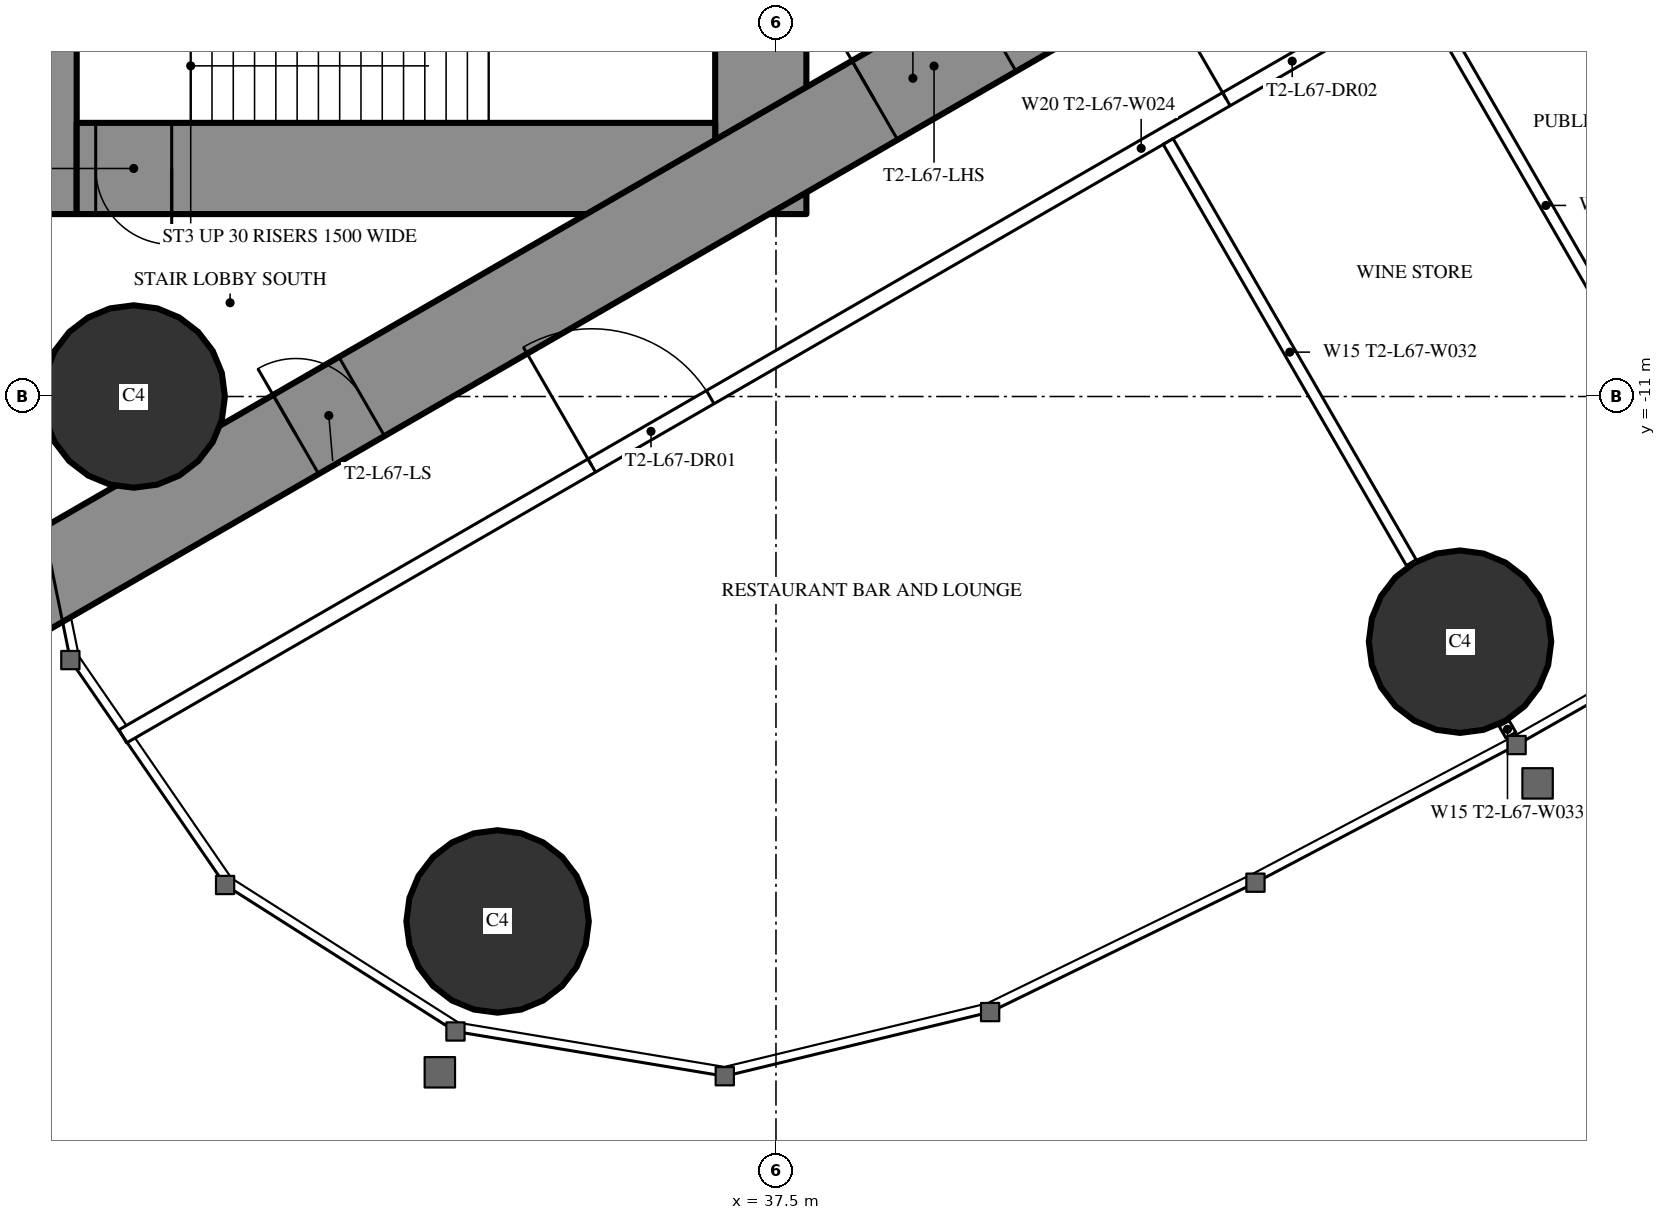
"""IFC4 building model, lengths in metres.
Left out: names, types, materials, properties, quantities, classifications, styles, units other than length and angle.
Written with IfcOpenShell. Run it as: python <this file> out.ifc"""

import sys

from ifc_helpers import new_model, si_unit, direction, frame, frame_2d, origin, origin_2d, place, context, subcontext, project, spatial, rectangle, circle, extrude, element, fill, save


model = new_model("IFC4")
c1 = context("Model", 3, precision=1e-05, world=origin(), true_north=direction((0.0, 1.0)))
c2 = subcontext(c1, "Body", "Model", "MODEL_VIEW")
j1 = project(units=[si_unit("LENGTHUNIT", "METRE"), si_unit("PLANEANGLEUNIT", "RADIAN")], contexts=[c1])
p1 = place(None, origin())
s1 = spatial("IfcSite", under=j1, at=p1, CompositionType="ELEMENT")
p2 = place(p1, origin())
s2 = spatial("IfcBuilding", under=s1, at=p2, CompositionType="ELEMENT")
p3 = place(p2, frame((0.0, 0.0, 251.9)))
s3 = spatial("IfcBuildingStorey", under=s2, at=p3, CompositionType="ELEMENT", Elevation=251.9)
for number, where, z_axis, x_axis in (
    (1, (33.837, -17.906, 0.0), (0.0, 0.0, 1.0), (1.0, 0.0, 0.0)),
    (2, (29.05, -11.0, 0.0), (0.0, 0.0, 1.0), (1.0, 0.0, 0.0)),
    (3, (46.499, -14.226, 0.0), (0.0, 0.0, 1.0), (1.0, 0.0, 0.0)),
):
    element("IfcColumn", number, at=place(p3, frame(where, z_axis=z_axis, x_axis=x_axis)), inside=s3, PredefinedType="COLUMN", context=c2, shape_type="SweptSolid", body=[
        extrude(circle(Radius=1.2, at=origin_2d()), origin(), (0.0, 0.0, 1.0), 5.4),
    ])
p4 = place(p3, frame((27.9, -8.6, 0.0), z_axis=(0.0, 0.0, 1.0), x_axis=(0.0, 1.0, 0.0)))
e4 = element("IfcWall", 4, at=p4, inside=s3, PredefinedType="SHEAR", context=c2, shape_type="SweptSolid", body=[
    extrude(rectangle(XDim=17.2, YDim=0.8, at=frame_2d((8.6, 0.0))), origin(), (0.0, 0.0, 1.0), 5.4),
])
p5 = place(p4, frame((9.35, 0.0, 0.0)))
e5 = element("IfcOpeningElement", 5, at=p5, cuts=e4, PredefinedType="OPENING", context=c2, shape_type="SweptSolid", body=[
    extrude(rectangle(XDim=0.9, YDim=2.2, at=frame_2d((0.45, 1.1))), frame((0.0, 0.41, 0.0), z_axis=(0.0, -1.0, 0.0), x_axis=(1.0, 0.0, 0.0)), (0.0, 0.0, 1.0), 0.82),
])
p6 = place(p3, frame((37.3, -8.6, 0.0), z_axis=(0.0, 0.0, 1.0), x_axis=(0.0, 1.0, 0.0)))
e6 = element("IfcWall", 6, at=p6, inside=s3, PredefinedType="SHEAR", context=c2, shape_type="SweptSolid", body=[
    extrude(rectangle(XDim=17.2, YDim=1.2, at=frame_2d((8.6, 0.0))), origin(), (0.0, 0.0, 1.0), 5.4),
])
p7 = place(p6, frame((7.7, 0.0, 0.0)))
e7 = element("IfcOpeningElement", 7, at=p7, cuts=e6, PredefinedType="OPENING", context=c2, shape_type="SweptSolid", body=[
    extrude(rectangle(XDim=1.8, YDim=2.2, at=frame_2d((0.9, 1.1))), frame((0.0, 0.61, 0.0), z_axis=(0.0, -1.0, 0.0), x_axis=(1.0, 0.0, 0.0)), (0.0, 0.0, 1.0), 1.22),
])
p8 = place(p3, frame((28.3, -8.0, 0.0), z_axis=(0.0, 0.0, 1.0), x_axis=(1.0, 0.0, 0.0)))
e8 = element("IfcWall", 8, at=p8, inside=s3, PredefinedType="SHEAR", context=c2, shape_type="SweptSolid", body=[
    extrude(rectangle(XDim=8.4, YDim=1.2, at=frame_2d((4.2, 0.0))), origin(), (0.0, 0.0, 1.0), 5.4),
])
p9 = place(p8, frame((0.25, 0.0, 0.0)))
e9 = element("IfcOpeningElement", 9, at=p9, cuts=e8, PredefinedType="OPENING", context=c2, shape_type="SweptSolid", body=[
    extrude(rectangle(XDim=1.0, YDim=2.2, at=frame_2d((0.5, 1.1))), frame((0.0, 0.61, 0.0), z_axis=(0.0, -1.0, 0.0), x_axis=(1.0, 0.0, 0.0)), (0.0, 0.0, 1.0), 1.22),
])
p10 = place(p3, frame((27.2, -13.8, 0.0), z_axis=(0.0, 0.0, 1.0), x_axis=(0.866027159892, 0.499996958321, 0.0)))
e10 = element("IfcWall", 10, at=p10, inside=s3, PredefinedType="SHEAR", context=c2, shape_type="SweptSolid", body=[
    extrude(rectangle(XDim=27.947, YDim=1.2, at=frame_2d((13.973, 0.0))), origin(), (0.0, 0.0, 1.0), 5.4),
])
p11 = place(p10, frame((4.6, 0.0, 0.0)))
e11 = element("IfcOpeningElement", 11, at=p11, cuts=e10, PredefinedType="OPENING", context=c2, shape_type="SweptSolid", body=[
    extrude(rectangle(XDim=1.0, YDim=2.2, at=frame_2d((0.5, 1.1))), frame((0.0, 0.61, 0.0), z_axis=(0.0, -1.0, 0.0), x_axis=(1.0, 0.0, 0.0)), (0.0, 0.0, 1.0), 1.22),
])
p12 = place(p10, frame((13.395, 0.0, 0.0)))
e12 = element("IfcOpeningElement", 12, at=p12, cuts=e10, PredefinedType="OPENING", context=c2, shape_type="SweptSolid", body=[
    extrude(rectangle(XDim=1.8, YDim=2.2, at=frame_2d((0.9, 1.1))), frame((0.0, 0.61, 0.0), z_axis=(0.0, -1.0, 0.0), x_axis=(1.0, 0.0, 0.0)), (0.0, 0.0, 1.0), 1.22),
])
p13 = place(p3, frame((28.907, -15.47, 0.0), z_axis=(0.0, 0.0, 1.0), x_axis=(0.866023700353, 0.500002950419, 0.0)))
e13 = element("IfcWall", 13, at=p13, inside=s3, PredefinedType="PARTITIONING", context=c2, shape_type="SweptSolid", body=[
    extrude(rectangle(XDim=30.941, YDim=0.2, at=frame_2d((15.47, 0.0))), origin(), (0.0, 0.0, 1.0), 5.15),
])
p14 = place(p13, frame((7.124, 0.0, 0.0)))
e14 = element("IfcOpeningElement", 14, at=p14, cuts=e13, PredefinedType="OPENING", context=c2, shape_type="SweptSolid", body=[
    extrude(rectangle(XDim=1.8, YDim=2.2, at=frame_2d((0.9, 1.1))), frame((0.0, 0.11, 0.0), z_axis=(0.0, -1.0, 0.0), x_axis=(1.0, 0.0, 0.0)), (0.0, 0.0, 1.0), 0.22),
])
p15 = place(p13, frame((16.765, 0.0, 0.0)))
e15 = element("IfcOpeningElement", 15, at=p15, cuts=e13, PredefinedType="OPENING", context=c2, shape_type="SweptSolid", body=[
    extrude(rectangle(XDim=2.0, YDim=2.4, at=frame_2d((1.0, 1.2))), frame((0.0, 0.11, 0.0), z_axis=(0.0, -1.0, 0.0), x_axis=(1.0, 0.0, 0.0)), (0.0, 0.0, 1.0), 0.22),
])
p16 = place(p13, frame((20.748, 0.0, 0.0)))
e16 = element("IfcOpeningElement", 16, at=p16, cuts=e13, PredefinedType="OPENING", context=c2, shape_type="SweptSolid", body=[
    extrude(rectangle(XDim=1.8, YDim=2.2, at=frame_2d((0.9, 1.1))), frame((0.0, 0.11, 0.0), z_axis=(0.0, -1.0, 0.0), x_axis=(1.0, 0.0, 0.0)), (0.0, 0.0, 1.0), 0.22),
])
p17 = place(p13, frame((26.252, 0.0, 0.0)))
e17 = element("IfcOpeningElement", 17, at=p17, cuts=e13, PredefinedType="OPENING", context=c2, shape_type="SweptSolid", body=[
    extrude(rectangle(XDim=1.8, YDim=2.2, at=frame_2d((0.9, 1.1))), frame((0.0, 0.11, 0.0), z_axis=(0.0, -1.0, 0.0), x_axis=(1.0, 0.0, 0.0)), (0.0, 0.0, 1.0), 0.22),
])
p18 = place(p3, frame((42.66, -7.646, 0.0), z_axis=(0.0, 0.0, 1.0), x_axis=(0.499996592859, -0.866027370889, 0.0)))
e18 = element("IfcWall", 18, at=p18, inside=s3, PredefinedType="PARTITIONING", context=c2, shape_type="SweptSolid", body=[
    extrude(rectangle(XDim=6.398, YDim=0.15, at=frame_2d((3.199, 0.0))), origin(), (0.0, 0.0, 1.0), 4.25),
])
p19 = place(p3, frame((47.079, -15.3, 0.0), z_axis=(0.0, 0.0, 1.0), x_axis=(0.499212083968, -0.866479829667, 0.0)))
e19 = element("IfcWall", 19, at=p19, inside=s3, PredefinedType="PARTITIONING", context=c2, shape_type="SweptSolid", body=[
    extrude(rectangle(XDim=0.179, YDim=0.15, at=frame_2d((0.09, 0.0))), origin(), (0.0, 0.0, 1.0), 4.25),
])
p20 = place(p3, frame((46.023, -5.704, 0.0), z_axis=(0.0, 0.0, 1.0), x_axis=(0.499984478165, -0.866034365135, 0.0)))
e20 = element("IfcWall", 20, at=p20, inside=s3, PredefinedType="PARTITIONING", context=c2, shape_type="SweptSolid", body=[
    extrude(rectangle(XDim=6.426, YDim=0.15, at=frame_2d((3.213, 0.0))), origin(), (0.0, 0.0, 1.0), 4.25),
])
p21 = place(p14, origin())
e21 = element("IfcDoor", 21, at=p21, inside=s3, OperationType="DOUBLE_DOOR_SINGLE_SWING", PredefinedType="DOOR", context=c2, shape_type="SweptSolid", body=[
    extrude(rectangle(XDim=1.8, YDim=2.2, at=frame_2d((0.9, 1.1))), frame((0.0, 0.025, 0.0), z_axis=(0.0, -1.0, 0.0), x_axis=(1.0, 0.0, 0.0)), (0.0, 0.0, 1.0), 0.05),
])
fill(e14, e21)
p22 = place(p15, origin())
e22 = element("IfcDoor", 22, at=p22, inside=s3, OperationType="DOUBLE_DOOR_SINGLE_SWING", PredefinedType="DOOR", context=c2, shape_type="SweptSolid", body=[
    extrude(rectangle(XDim=2.0, YDim=2.4, at=frame_2d((1.0, 1.2))), frame((0.0, 0.025, 0.0), z_axis=(0.0, -1.0, 0.0), x_axis=(1.0, 0.0, 0.0)), (0.0, 0.0, 1.0), 0.05),
])
fill(e15, e22)
p23 = place(p11, origin())
e23 = element("IfcDoor", 23, at=p23, inside=s3, OperationType="SINGLE_SWING_LEFT", PredefinedType="DOOR", context=c2, shape_type="SweptSolid", body=[
    extrude(rectangle(XDim=1.0, YDim=2.2, at=frame_2d((0.5, 1.1))), frame((0.0, 0.025, 0.0), z_axis=(0.0, -1.0, 0.0), x_axis=(1.0, 0.0, 0.0)), (0.0, 0.0, 1.0), 0.05),
])
fill(e11, e23)
p24 = place(p12, origin())
e24 = element("IfcDoor", 24, at=p24, inside=s3, OperationType="DOUBLE_DOOR_SINGLE_SWING", PredefinedType="DOOR", context=c2, shape_type="SweptSolid", body=[
    extrude(rectangle(XDim=1.8, YDim=2.2, at=frame_2d((0.9, 1.1))), frame((0.0, 0.025, 0.0), z_axis=(0.0, -1.0, 0.0), x_axis=(1.0, 0.0, 0.0)), (0.0, 0.0, 1.0), 0.05),
])
fill(e12, e24)
p25 = place(p9, origin())
e25 = element("IfcDoor", 25, at=p25, inside=s3, OperationType="SINGLE_SWING_RIGHT", PredefinedType="DOOR", context=c2, shape_type="SweptSolid", body=[
    extrude(rectangle(XDim=1.0, YDim=2.2, at=frame_2d((0.5, 1.1))), frame((0.0, 0.025, 0.0), z_axis=(0.0, -1.0, 0.0), x_axis=(1.0, 0.0, 0.0)), (0.0, 0.0, 1.0), 0.05),
])
fill(e9, e25)
save(model, sys.argv[1])
